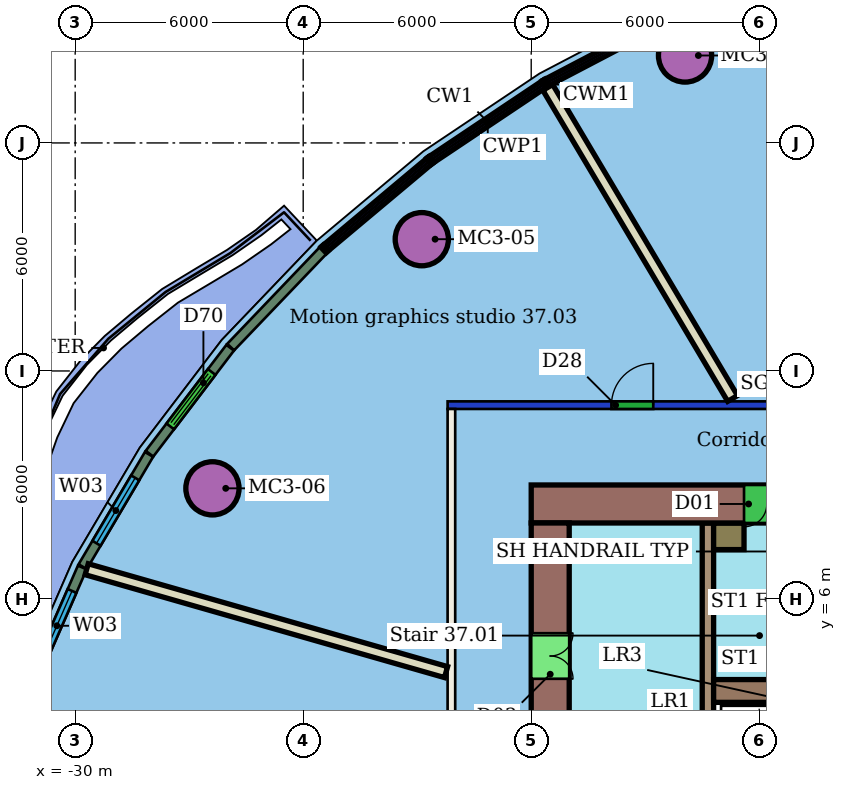
"""IFC4 building model, lengths in metres.
Left out: names, types, materials, properties, quantities, classifications, styles, units other than length and angle.
Written with IfcOpenShell. Run it as: python <this file> out.ifc"""

import sys

from ifc_helpers import new_model, si_unit, direction, frame, frame_2d, origin, origin_2d, place, context, subcontext, project, spatial, rectangle, hollow_circle, extrude, element, fill, save


model = new_model("IFC4")
c1 = context("Model", 3, precision=1e-05, world=origin(), true_north=direction((0.0, 1.0)))
c2 = subcontext(c1, "Body", "Model", "MODEL_VIEW")
j1 = project(units=[si_unit("LENGTHUNIT", "METRE"), si_unit("PLANEANGLEUNIT", "RADIAN")], contexts=[c1])
p1 = place(None, origin())
s1 = spatial("IfcSite", under=j1, at=p1, CompositionType="ELEMENT")
p2 = place(p1, origin())
s2 = spatial("IfcBuilding", under=s1, at=p2, CompositionType="ELEMENT")
p3 = place(p2, frame((0.0, 0.0, 157.8)))
s3 = spatial("IfcBuildingStorey", under=s2, at=p3, CompositionType="ELEMENT", Elevation=157.8)
for number, where, z_axis, x_axis in (
    (1, (-13.952, 20.301, 0.0), (0.0, 0.0, 1.0), (1.0, 0.0, 0.0)),
    (2, (-20.879, 15.467, 0.0), (0.0, 0.0, 1.0), (1.0, 0.0, 0.0)),
    (3, (-26.388, 8.912, 0.0), (0.0, 0.0, 1.0), (1.0, 0.0, 0.0)),
):
    element("IfcColumn", number, at=place(p3, frame(where, z_axis=z_axis, x_axis=x_axis)), inside=s3, PredefinedType="COLUMN", context=c2, shape_type="SweptSolid", body=[
        extrude(hollow_circle(Radius=0.7, WallThickness=0.05, at=origin_2d()), origin(), (0.0, 0.0, 1.0), 3.45),
    ])
p4 = place(p3, frame((-20.1, -11.0, 0.0), z_axis=(0.0, 0.0, 1.0), x_axis=(0.0, 1.0, 0.0)))
e4 = element("IfcWall", 4, at=p4, inside=s3, PredefinedType="PARTITIONING", context=c2, shape_type="SweptSolid", body=[
    extrude(rectangle(XDim=22.0, YDim=0.2, at=frame_2d((11.0, 0.0))), origin(), (0.0, 0.0, 1.0), 3.45),
])
p5 = place(p4, frame((8.568, 0.0, 0.0)))
e5 = element("IfcOpeningElement", 5, at=p5, cuts=e4, PredefinedType="OPENING", context=c2, shape_type="SweptSolid", body=[
    extrude(rectangle(XDim=1.8, YDim=2.1, at=frame_2d((0.9, 1.05))), frame((0.0, 0.11, 0.0), z_axis=(0.0, -1.0, 0.0), x_axis=(1.0, 0.0, 0.0)), (0.0, 0.0, 1.0), 0.22),
])
p6 = place(p4, frame((3.429, 0.0, 0.0)))
e6 = element("IfcOpeningElement", 6, at=p6, cuts=e4, PredefinedType="OPENING", context=c2, shape_type="SweptSolid", body=[
    extrude(rectangle(XDim=1.0, YDim=2.1, at=frame_2d((0.5, 1.05))), frame((0.0, 0.11, 0.0), z_axis=(0.0, -1.0, 0.0), x_axis=(1.0, 0.0, 0.0)), (0.0, 0.0, 1.0), 0.22),
])
p7 = place(p3, frame((-20.2, 11.1, 0.0), z_axis=(0.0, 0.0, 1.0), x_axis=(1.0, 0.0, 0.0)))
e7 = element("IfcWall", 7, at=p7, inside=s3, PredefinedType="PARTITIONING", context=c2, shape_type="SweptSolid", body=[
    extrude(rectangle(XDim=28.4, YDim=0.2, at=frame_2d((14.2, 0.0))), origin(), (0.0, 0.0, 1.0), 3.05),
])
p8 = place(p7, frame((21.032, 0.0, 0.0)))
e8 = element("IfcOpeningElement", 8, at=p8, cuts=e7, PredefinedType="OPENING", context=c2, shape_type="SweptSolid", body=[
    extrude(rectangle(XDim=0.9, YDim=2.1, at=frame_2d((0.45, 1.05))), frame((0.0, 0.11, 0.0), z_axis=(0.0, -1.0, 0.0), x_axis=(1.0, 0.0, 0.0)), (0.0, 0.0, 1.0), 0.22),
])
p9 = place(p7, frame((14.79, 0.0, 0.0)))
e9 = element("IfcOpeningElement", 9, at=p9, cuts=e7, PredefinedType="OPENING", context=c2, shape_type="SweptSolid", body=[
    extrude(rectangle(XDim=1.8, YDim=2.1, at=frame_2d((0.9, 1.05))), frame((0.0, 0.11, 0.0), z_axis=(0.0, -1.0, 0.0), x_axis=(1.0, 0.0, 0.0)), (0.0, 0.0, 1.0), 0.22),
])
p10 = place(p7, frame((4.311, 0.0, 0.0)))
e10 = element("IfcOpeningElement", 10, at=p10, cuts=e7, PredefinedType="OPENING", context=c2, shape_type="SweptSolid", body=[
    extrude(rectangle(XDim=1.1, YDim=2.1, at=frame_2d((0.55, 1.05))), frame((0.0, 0.11, 0.0), z_axis=(0.0, -1.0, 0.0), x_axis=(1.0, 0.0, 0.0)), (0.0, 0.0, 1.0), 0.22),
])
p11 = place(p3, frame((-17.564, 19.461, 0.0), z_axis=(0.0, 0.0, 1.0), x_axis=(0.510836754181, -0.859677736467, 0.0)))
e11 = element("IfcWall", 11, at=p11, inside=s3, PredefinedType="PARTITIONING", context=c2, shape_type="SweptSolid", body=[
    extrude(rectangle(XDim=9.52, YDim=0.3, at=frame_2d((4.76, 0.0))), origin(), (0.0, 0.0, 1.0), 3.45),
])
p12 = place(p3, frame((-29.697, 6.783, 0.0), z_axis=(0.0, 0.0, 1.0), x_axis=(0.961388014147, -0.275196450295, 0.0)))
e12 = element("IfcWall", 12, at=p12, inside=s3, PredefinedType="PARTITIONING", context=c2, shape_type="SweptSolid", body=[
    extrude(rectangle(XDim=9.836, YDim=0.3, at=frame_2d((4.918, 0.0))), origin(), (0.0, 0.0, 1.0), 3.45),
])
p13 = place(p3, frame((-23.475, 15.171, 0.0), z_axis=(0.0, 0.0, 1.0), x_axis=(-0.691359678914, -0.722510757271, 0.0)))
e13 = element("IfcWall", 13, at=p13, inside=s3, PredefinedType="SOLIDWALL", context=c2, shape_type="SweptSolid", body=[
    extrude(rectangle(XDim=3.519, YDim=0.25, at=frame_2d((1.76, 0.0))), origin(), (0.0, 0.0, 1.0), 3.1),
])
p14 = place(p3, frame((-25.922, 12.611, 0.0), z_axis=(0.0, 0.0, 1.0), x_axis=(-0.605625422528, -0.795749864962, 0.0)))
e14 = element("IfcWall", 14, at=p14, inside=s3, PredefinedType="SOLIDWALL", context=c2, shape_type="SweptSolid", body=[
    extrude(rectangle(XDim=3.504, YDim=0.25, at=frame_2d((1.752, 0.0))), origin(), (0.0, 0.0, 1.0), 3.1),
])
p15 = place(p14, frame((0.802, 0.0, 0.0)))
e15 = element("IfcOpeningElement", 15, at=p15, cuts=e14, PredefinedType="OPENING", context=c2, shape_type="SweptSolid", body=[
    extrude(rectangle(XDim=1.8, YDim=2.4, at=frame_2d((0.9, 1.2))), frame((0.0, 0.135, 0.0), z_axis=(0.0, -1.0, 0.0), x_axis=(1.0, 0.0, 0.0)), (0.0, 0.0, 1.0), 0.27),
])
p16 = place(p3, frame((-28.057, 9.804, 0.0), z_axis=(0.0, 0.0, 1.0), x_axis=(-0.508707735762, -0.860939277519, 0.0)))
e16 = element("IfcWall", 16, at=p16, inside=s3, PredefinedType="SOLIDWALL", context=c2, shape_type="SweptSolid", body=[
    extrude(rectangle(XDim=3.431, YDim=0.25, at=frame_2d((1.715, 0.0))), origin(), (0.0, 0.0, 1.0), 3.1),
])
p17 = place(p16, frame((0.716, 0.0, 0.9)))
e17 = element("IfcOpeningElement", 17, at=p17, cuts=e16, PredefinedType="OPENING", context=c2, shape_type="SweptSolid", body=[
    extrude(rectangle(XDim=2.0, YDim=2.1, at=frame_2d((1.0, 1.05))), frame((0.0, 0.135, 0.0), z_axis=(0.0, -1.0, 0.0), x_axis=(1.0, 0.0, 0.0)), (0.0, 0.0, 1.0), 0.27),
])
p18 = place(p3, frame((-29.813, 6.83, 0.0), z_axis=(0.0, 0.0, 1.0), x_axis=(-0.399984559648, -0.916521877559, 0.0)))
e18 = element("IfcWall", 18, at=p18, inside=s3, PredefinedType="SOLIDWALL", context=c2, shape_type="SweptSolid", body=[
    extrude(rectangle(XDim=3.347, YDim=0.25, at=frame_2d((1.674, 0.0))), origin(), (0.0, 0.0, 1.0), 3.1),
])
p19 = place(p18, frame((0.674, 0.0, 0.9)))
e19 = element("IfcOpeningElement", 19, at=p19, cuts=e18, PredefinedType="OPENING", context=c2, shape_type="SweptSolid", body=[
    extrude(rectangle(XDim=2.0, YDim=2.1, at=frame_2d((1.0, 1.05))), frame((0.0, 0.135, 0.0), z_axis=(0.0, -1.0, 0.0), x_axis=(1.0, 0.0, 0.0)), (0.0, 0.0, 1.0), 0.27),
])
p20 = place(p3, frame((-6.0, 8.5, 0.0), z_axis=(0.0, 0.0, 1.0), x_axis=(-1.0, 0.0, 0.0)))
e20 = element("IfcWall", 20, at=p20, inside=s3, PredefinedType="SHEAR", context=c2, shape_type="SweptSolid", body=[
    extrude(rectangle(XDim=12.0, YDim=1.0, at=frame_2d((6.0, 0.0))), origin(), (0.0, 0.0, 1.0), 3.3),
])
p21 = place(p20, frame((5.2, 0.0, 0.0)))
e21 = element("IfcOpeningElement", 21, at=p21, cuts=e20, PredefinedType="OPENING", context=c2, shape_type="SweptSolid", body=[
    extrude(rectangle(XDim=1.2, YDim=2.1, at=frame_2d((0.6, 1.05))), frame((0.0, 0.51, 0.0), z_axis=(0.0, -1.0, 0.0), x_axis=(1.0, 0.0, 0.0)), (0.0, 0.0, 1.0), 1.02),
])
p22 = place(p3, frame((-17.5, 8.0, 0.0), z_axis=(0.0, 0.0, 1.0), x_axis=(0.0, -1.0, 0.0)))
e22 = element("IfcWall", 22, at=p22, inside=s3, PredefinedType="SHEAR", context=c2, shape_type="SweptSolid", body=[
    extrude(rectangle(XDim=16.0, YDim=1.0, at=frame_2d((8.0, 0.0))), origin(), (0.0, 0.0, 1.0), 3.3),
])
p23 = place(p22, frame((11.9, 0.0, 0.0)))
e23 = element("IfcOpeningElement", 23, at=p23, cuts=e22, PredefinedType="OPENING", context=c2, shape_type="SweptSolid", body=[
    extrude(rectangle(XDim=1.2, YDim=2.1, at=frame_2d((0.6, 1.05))), frame((0.0, 0.51, 0.0), z_axis=(0.0, -1.0, 0.0), x_axis=(1.0, 0.0, 0.0)), (0.0, 0.0, 1.0), 1.02),
])
p24 = place(p22, frame((2.9, 0.0, 0.0)))
e24 = element("IfcOpeningElement", 24, at=p24, cuts=e22, PredefinedType="OPENING", context=c2, shape_type="SweptSolid", body=[
    extrude(rectangle(XDim=1.2, YDim=2.1, at=frame_2d((0.6, 1.05))), frame((0.0, 0.51, 0.0), z_axis=(0.0, -1.0, 0.0), x_axis=(1.0, 0.0, 0.0)), (0.0, 0.0, 1.0), 1.02),
])
p25 = place(p3, frame((-13.2, 3.58, 0.0), z_axis=(0.0, 0.0, 1.0), x_axis=(1.0, 0.0, 0.0)))
e25 = element("IfcWall", 25, at=p25, inside=s3, PredefinedType="SHEAR", context=c2, shape_type="SweptSolid", body=[
    extrude(rectangle(XDim=7.2, YDim=0.6, at=frame_2d((3.6, 0.0))), origin(), (0.0, 0.0, 1.0), 3.3),
])
p26 = place(p3, frame((-13.35, 8.0, 0.0), z_axis=(0.0, 0.0, 1.0), x_axis=(0.0, -1.0, 0.0)))
e26 = element("IfcWall", 26, at=p26, inside=s3, PredefinedType="SHEAR", context=c2, shape_type="SweptSolid", body=[
    extrude(rectangle(XDim=16.0, YDim=0.3, at=frame_2d((8.0, 0.0))), origin(), (0.0, 0.0, 1.0), 3.3),
])
p27 = place(p26, frame((7.25, 0.0, 0.0)))
e27 = element("IfcOpeningElement", 27, at=p27, cuts=e26, PredefinedType="OPENING", context=c2, shape_type="SweptSolid", body=[
    extrude(rectangle(XDim=1.5, YDim=2.1, at=frame_2d((0.75, 1.05))), frame((0.0, 0.16, 0.0), z_axis=(0.0, -1.0, 0.0), x_axis=(1.0, 0.0, 0.0)), (0.0, 0.0, 1.0), 0.32),
])
p28 = place(p3, frame((-13.2, 7.65, 0.0), z_axis=(0.0, 0.0, 1.0), x_axis=(1.0, 0.0, 0.0)))
e28 = element("IfcWall", 28, at=p28, inside=s3, PredefinedType="SHEAR", context=c2, shape_type="SweptSolid", body=[
    extrude(rectangle(XDim=0.8, YDim=0.7, at=frame_2d((0.4, 0.0))), origin(), (0.0, 0.0, 1.0), 3.3),
])
p29 = place(p10, origin())
e29 = element("IfcDoor", 29, at=p29, inside=s3, OperationType="SINGLE_SWING_RIGHT", PredefinedType="DOOR", context=c2, shape_type="SweptSolid", body=[
    extrude(rectangle(XDim=1.1, YDim=2.1, at=frame_2d((0.55, 1.05))), frame((0.0, 0.025, 0.0), z_axis=(0.0, -1.0, 0.0), x_axis=(1.0, 0.0, 0.0)), (0.0, 0.0, 1.0), 0.05),
])
fill(e10, e29)
p30 = place(p15, origin())
e30 = element("IfcDoor", 30, at=p30, inside=s3, OperationType="DOUBLE_DOOR_SLIDING", PredefinedType="DOOR", context=c2, shape_type="SweptSolid", body=[
    extrude(rectangle(XDim=1.8, YDim=2.4, at=frame_2d((0.9, 1.2))), frame((0.0, 0.025, 0.0), z_axis=(0.0, -1.0, 0.0), x_axis=(1.0, 0.0, 0.0)), (0.0, 0.0, 1.0), 0.05),
])
fill(e15, e30)
p31 = place(p17, origin())
e31 = element("IfcWindow", 31, at=p31, inside=s3, PartitioningType="SINGLE_PANEL", PredefinedType="WINDOW", context=c2, shape_type="SweptSolid", body=[
    extrude(rectangle(XDim=2.0, YDim=2.1, at=frame_2d((1.0, 1.05))), frame((0.0, 0.03, 0.0), z_axis=(0.0, -1.0, 0.0), x_axis=(1.0, 0.0, 0.0)), (0.0, 0.0, 1.0), 0.06),
])
fill(e17, e31)
p32 = place(p19, origin())
e32 = element("IfcWindow", 32, at=p32, inside=s3, PartitioningType="SINGLE_PANEL", PredefinedType="WINDOW", context=c2, shape_type="SweptSolid", body=[
    extrude(rectangle(XDim=2.0, YDim=2.1, at=frame_2d((1.0, 1.05))), frame((0.0, 0.03, 0.0), z_axis=(0.0, -1.0, 0.0), x_axis=(1.0, 0.0, 0.0)), (0.0, 0.0, 1.0), 0.06),
])
fill(e19, e32)
p33 = place(p21, origin())
e33 = element("IfcDoor", 33, at=p33, inside=s3, OperationType="DOUBLE_DOOR_SINGLE_SWING", PredefinedType="NOTDEFINED", context=c2, shape_type="SweptSolid", body=[
    extrude(rectangle(XDim=1.2, YDim=2.1, at=frame_2d((0.6, 1.05))), frame((0.0, 0.025, 0.0), z_axis=(0.0, -1.0, 0.0), x_axis=(1.0, 0.0, 0.0)), (0.0, 0.0, 1.0), 0.05),
])
fill(e21, e33)
p34 = place(p24, origin())
e34 = element("IfcDoor", 34, at=p34, inside=s3, OperationType="DOUBLE_DOOR_SINGLE_SWING", PredefinedType="NOTDEFINED", context=c2, shape_type="SweptSolid", body=[
    extrude(rectangle(XDim=1.2, YDim=2.1, at=frame_2d((0.6, 1.05))), frame((0.0, 0.025, 0.0), z_axis=(0.0, -1.0, 0.0), x_axis=(1.0, 0.0, 0.0)), (0.0, 0.0, 1.0), 0.05),
])
fill(e24, e34)
save(model, sys.argv[1])
